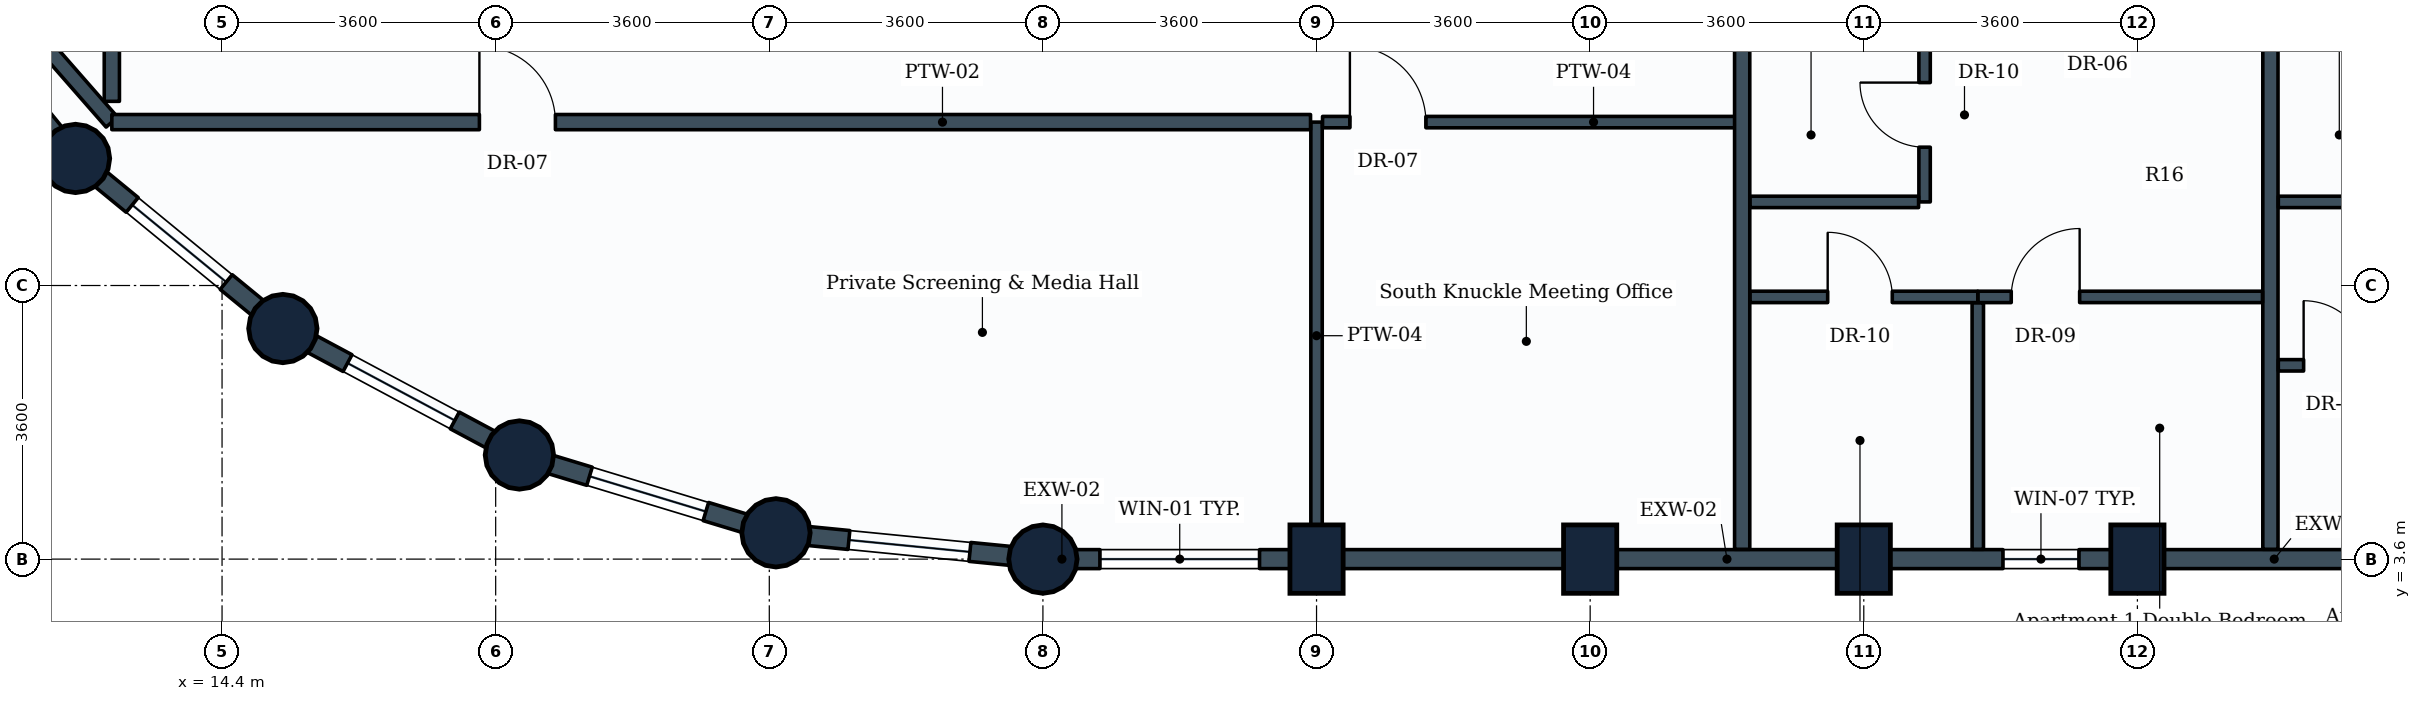
"""IFC4 building model, lengths in metres.
Left out: names, types, materials, properties, quantities, classifications, styles, units other than length and angle.
Written with IfcOpenShell. Run it as: python <this file> out.ifc"""

import sys

from ifc_helpers import new_model, si_unit, direction, frame, frame_2d, origin, origin_2d, place, context, subcontext, project, spatial, rectangle, circle, extrude, element, fill, save


model = new_model("IFC4")
c1 = context("Model", 3, precision=1e-05, world=origin(), true_north=direction((0.0, 1.0)))
c2 = subcontext(c1, "Body", "Model", "MODEL_VIEW")
j1 = project(units=[si_unit("LENGTHUNIT", "METRE"), si_unit("PLANEANGLEUNIT", "RADIAN")], contexts=[c1])
p1 = place(None, origin())
s1 = spatial("IfcSite", under=j1, at=p1, CompositionType="ELEMENT")
p2 = place(p1, origin())
s2 = spatial("IfcBuilding", under=s1, at=p2, CompositionType="ELEMENT")
p3 = place(p2, frame((0.0, 0.0, 186.2)))
s3 = spatial("IfcBuildingStorey", under=s2, at=p3, CompositionType="ELEMENT", Elevation=186.2)
for number, where, z_axis, x_axis in (
    (1, (12.472, 8.872, 0.0), (0.0, 0.0, 1.0), (1.0, 0.0, 0.0)),
    (2, (15.2, 6.634, 0.0), (0.0, 0.0, 1.0), (1.0, 0.0, 0.0)),
    (3, (18.312, 4.97, 0.0), (0.0, 0.0, 1.0), (1.0, 0.0, 0.0)),
    (4, (21.688, 3.946, 0.0), (0.0, 0.0, 1.0), (1.0, 0.0, 0.0)),
    (5, (25.2, 3.6, 0.0), (0.0, 0.0, 1.0), (1.0, 0.0, 0.0)),
):
    element("IfcColumn", number, at=place(p3, frame(where, z_axis=z_axis, x_axis=x_axis)), inside=s3, PredefinedType="COLUMN", context=c2, shape_type="SweptSolid", body=[
        extrude(circle(Radius=0.45, at=origin_2d()), origin(), (0.0, 0.0, 1.0), 3.8),
    ])
for number, where, z_axis, x_axis in (
    (6, (28.8, 3.6, 0.0), (0.0, 0.0, 1.0), (1.0, 0.0, 0.0)),
    (7, (32.4, 3.6, 0.0), (0.0, 0.0, 1.0), (1.0, 0.0, 0.0)),
    (8, (36.0, 3.6, 0.0), (0.0, 0.0, 1.0), (1.0, 0.0, 0.0)),
    (9, (39.6, 3.6, 0.0), (0.0, 0.0, 1.0), (1.0, 0.0, 0.0)),
):
    element("IfcColumn", number, at=place(p3, frame(where, z_axis=z_axis, x_axis=x_axis)), inside=s3, PredefinedType="COLUMN", context=c2, shape_type="SweptSolid", body=[
        extrude(rectangle(XDim=0.7, YDim=0.9, at=origin_2d()), origin(), (0.0, 0.0, 1.0), 3.8),
    ])
p4 = place(p3, frame((28.8, 3.6, 0.0), z_axis=(0.0, 0.0, 1.0), x_axis=(-1.0, 0.0, 0.0)))
e10 = element("IfcWall", 10, at=p4, inside=s3, PredefinedType="STANDARD", context=c2, shape_type="SweptSolid", body=[
    extrude(rectangle(XDim=3.6, YDim=0.25, at=frame_2d((1.8, 0.0))), origin(), (0.0, 0.0, 1.0), 2.93),
])
p5 = place(p4, frame((0.75, 0.0, 0.85)))
e11 = element("IfcOpeningElement", 11, at=p5, cuts=e10, PredefinedType="OPENING", context=c2, shape_type="SweptSolid", body=[
    extrude(rectangle(XDim=2.1, YDim=1.35, at=frame_2d((1.05, 0.675))), frame((0.0, 0.135, 0.0), z_axis=(0.0, -1.0, 0.0), x_axis=(1.0, 0.0, 0.0)), (0.0, 0.0, 1.0), 0.27),
])
p6 = place(p3, frame((32.4, 3.6, 0.0), z_axis=(0.0, 0.0, 1.0), x_axis=(-1.0, 0.0, 0.0)))
e12 = element("IfcWall", 12, at=p6, inside=s3, PredefinedType="STANDARD", context=c2, shape_type="SweptSolid", body=[
    extrude(rectangle(XDim=3.6, YDim=0.25, at=frame_2d((1.8, 0.0))), origin(), (0.0, 0.0, 1.0), 2.93),
])
p7 = place(p3, frame((36.0, 3.6, 0.0), z_axis=(0.0, 0.0, 1.0), x_axis=(-1.0, 0.0, 0.0)))
e13 = element("IfcWall", 13, at=p7, inside=s3, PredefinedType="STANDARD", context=c2, shape_type="SweptSolid", body=[
    extrude(rectangle(XDim=3.6, YDim=0.25, at=frame_2d((1.8, 0.0))), origin(), (0.0, 0.0, 1.0), 2.93),
])
p8 = place(p3, frame((39.6, 3.6, 0.0), z_axis=(0.0, 0.0, 1.0), x_axis=(-1.0, 0.0, 0.0)))
e14 = element("IfcWall", 14, at=p8, inside=s3, PredefinedType="STANDARD", context=c2, shape_type="SweptSolid", body=[
    extrude(rectangle(XDim=3.6, YDim=0.25, at=frame_2d((1.8, 0.0))), origin(), (0.0, 0.0, 1.0), 2.93),
])
p9 = place(p8, frame((0.769, 0.0, 0.85)))
e15 = element("IfcOpeningElement", 15, at=p9, cuts=e14, PredefinedType="OPENING", context=c2, shape_type="SweptSolid", body=[
    extrude(rectangle(XDim=1.0, YDim=1.35, at=frame_2d((0.5, 0.675))), frame((0.0, 0.135, 0.0), z_axis=(0.0, -1.0, 0.0), x_axis=(1.0, 0.0, 0.0)), (0.0, 0.0, 1.0), 0.27),
])
p10 = place(p3, frame((43.2, 3.6, 0.0), z_axis=(0.0, 0.0, 1.0), x_axis=(-1.0, 0.0, 0.0)))
e16 = element("IfcWall", 16, at=p10, inside=s3, PredefinedType="STANDARD", context=c2, shape_type="SweptSolid", body=[
    extrude(rectangle(XDim=3.6, YDim=0.25, at=frame_2d((1.8, 0.0))), origin(), (0.0, 0.0, 1.0), 2.93),
])
p11 = place(p3, frame((12.472, 8.872, 0.0), z_axis=(0.0, 0.0, 1.0), x_axis=(-0.634258295121, 0.773121216285, 0.0)))
e17 = element("IfcWall", 17, at=p11, inside=s3, PredefinedType="STANDARD", context=c2, shape_type="SweptSolid", body=[
    extrude(rectangle(XDim=3.529, YDim=0.25, at=frame_2d((1.764, 0.0))), origin(), (0.0, 0.0, 1.0), 2.93),
])
p12 = place(p11, frame((0.964, 0.0, 0.85)))
e18 = element("IfcOpeningElement", 18, at=p12, cuts=e17, PredefinedType="OPENING", context=c2, shape_type="SweptSolid", body=[
    extrude(rectangle(XDim=1.6, YDim=1.35, at=frame_2d((0.8, 0.675))), frame((0.0, 0.135, 0.0), z_axis=(0.0, -1.0, 0.0), x_axis=(1.0, 0.0, 0.0)), (0.0, 0.0, 1.0), 0.27),
])
p13 = place(p3, frame((15.2, 6.634, 0.0), z_axis=(0.0, 0.0, 1.0), x_axis=(-0.773121216285, 0.634258295121, 0.0)))
e19 = element("IfcWall", 19, at=p13, inside=s3, PredefinedType="STANDARD", context=c2, shape_type="SweptSolid", body=[
    extrude(rectangle(XDim=3.529, YDim=0.25, at=frame_2d((1.764, 0.0))), origin(), (0.0, 0.0, 1.0), 2.93),
])
p14 = place(p13, frame((0.964, 0.0, 0.85)))
e20 = element("IfcOpeningElement", 20, at=p14, cuts=e19, PredefinedType="OPENING", context=c2, shape_type="SweptSolid", body=[
    extrude(rectangle(XDim=1.6, YDim=1.35, at=frame_2d((0.8, 0.675))), frame((0.0, 0.135, 0.0), z_axis=(0.0, -1.0, 0.0), x_axis=(1.0, 0.0, 0.0)), (0.0, 0.0, 1.0), 0.27),
])
p15 = place(p3, frame((18.312, 4.97, 0.0), z_axis=(0.0, 0.0, 1.0), x_axis=(-0.881846862014, 0.471535907389, 0.0)))
e21 = element("IfcWall", 21, at=p15, inside=s3, PredefinedType="STANDARD", context=c2, shape_type="SweptSolid", body=[
    extrude(rectangle(XDim=3.529, YDim=0.25, at=frame_2d((1.765, 0.0))), origin(), (0.0, 0.0, 1.0), 2.93),
])
p16 = place(p15, frame((0.964, 0.0, 0.85)))
e22 = element("IfcOpeningElement", 22, at=p16, cuts=e21, PredefinedType="OPENING", context=c2, shape_type="SweptSolid", body=[
    extrude(rectangle(XDim=1.6, YDim=1.35, at=frame_2d((0.8, 0.675))), frame((0.0, 0.135, 0.0), z_axis=(0.0, -1.0, 0.0), x_axis=(1.0, 0.0, 0.0)), (0.0, 0.0, 1.0), 0.27),
])
p17 = place(p3, frame((21.688, 3.946, 0.0), z_axis=(0.0, 0.0, 1.0), x_axis=(-0.956953367403, 0.290241714123, 0.0)))
e23 = element("IfcWall", 23, at=p17, inside=s3, PredefinedType="STANDARD", context=c2, shape_type="SweptSolid", body=[
    extrude(rectangle(XDim=3.528, YDim=0.25, at=frame_2d((1.764, 0.0))), origin(), (0.0, 0.0, 1.0), 2.93),
])
p18 = place(p17, frame((0.964, 0.0, 0.85)))
e24 = element("IfcOpeningElement", 24, at=p18, cuts=e23, PredefinedType="OPENING", context=c2, shape_type="SweptSolid", body=[
    extrude(rectangle(XDim=1.6, YDim=1.35, at=frame_2d((0.8, 0.675))), frame((0.0, 0.135, 0.0), z_axis=(0.0, -1.0, 0.0), x_axis=(1.0, 0.0, 0.0)), (0.0, 0.0, 1.0), 0.27),
])
p19 = place(p3, frame((25.2, 3.6, 0.0), z_axis=(0.0, 0.0, 1.0), x_axis=(-0.995183369056, 0.098030923459, 0.0)))
e25 = element("IfcWall", 25, at=p19, inside=s3, PredefinedType="STANDARD", context=c2, shape_type="SweptSolid", body=[
    extrude(rectangle(XDim=3.529, YDim=0.25, at=frame_2d((1.765, 0.0))), origin(), (0.0, 0.0, 1.0), 2.93),
])
p20 = place(p19, frame((0.965, 0.0, 0.85)))
e26 = element("IfcOpeningElement", 26, at=p20, cuts=e25, PredefinedType="OPENING", context=c2, shape_type="SweptSolid", body=[
    extrude(rectangle(XDim=1.6, YDim=1.35, at=frame_2d((0.8, 0.675))), frame((0.0, 0.135, 0.0), z_axis=(0.0, -1.0, 0.0), x_axis=(1.0, 0.0, 0.0)), (0.0, 0.0, 1.0), 0.27),
])
p21 = place(p3, frame((28.8, 9.35, 0.0), z_axis=(0.0, 0.0, 1.0), x_axis=(0.0, -1.0, 0.0)))
e27 = element("IfcWall", 27, at=p21, inside=s3, PredefinedType="PARTITIONING", context=c2, shape_type="SweptSolid", body=[
    extrude(rectangle(XDim=5.621, YDim=0.15, at=frame_2d((2.811, 0.0))), origin(), (0.0, 0.0, 1.0), 3.535),
])
p22 = place(p3, frame((12.95, 9.35, 0.0), z_axis=(0.0, 0.0, 1.0), x_axis=(-0.658639514157, 0.752458630352, 0.0)))
e28 = element("IfcWall", 28, at=p22, inside=s3, PredefinedType="PARTITIONING", context=c2, shape_type="SweptSolid", body=[
    extrude(rectangle(XDim=4.996, YDim=0.2, at=frame_2d((2.498, 0.0))), origin(), (0.0, 0.0, 1.0), 2.93),
])
p23 = place(p3, frame((12.95, 9.623, 0.0), z_axis=(0.0, 0.0, 1.0), x_axis=(0.0, 1.0, 0.0)))
e29 = element("IfcWall", 29, at=p23, inside=s3, PredefinedType="PARTITIONING", context=c2, shape_type="SweptSolid", body=[
    extrude(rectangle(XDim=6.873, YDim=0.2, at=frame_2d((3.437, 0.0))), origin(), (0.0, 0.0, 1.0), 3.17),
])
p24 = place(p23, frame((3.958, 0.0, 0.0)))
e30 = element("IfcOpeningElement", 30, at=p24, cuts=e29, PredefinedType="OPENING", context=c2, shape_type="SweptSolid", body=[
    extrude(rectangle(XDim=1.0, YDim=2.1, at=frame_2d((0.5, 1.05))), frame((0.0, 0.11, 0.0), z_axis=(0.0, -1.0, 0.0), x_axis=(1.0, 0.0, 0.0)), (0.0, 0.0, 1.0), 0.22),
])
p25 = place(p3, frame((12.95, 9.35, 0.0), z_axis=(0.0, 0.0, 1.0), x_axis=(1.0, 0.0, 0.0)))
e31 = element("IfcWall", 31, at=p25, inside=s3, PredefinedType="PARTITIONING", context=c2, shape_type="SweptSolid", body=[
    extrude(rectangle(XDim=15.771, YDim=0.2, at=frame_2d((7.885, 0.0))), origin(), (0.0, 0.0, 1.0), 3.17),
])
p26 = place(p25, frame((4.836, 0.0, 0.0)))
e32 = element("IfcOpeningElement", 32, at=p26, cuts=e31, PredefinedType="OPENING", context=c2, shape_type="SweptSolid", body=[
    extrude(rectangle(XDim=1.0, YDim=2.1, at=frame_2d((0.5, 1.05))), frame((0.0, 0.11, 0.0), z_axis=(0.0, -1.0, 0.0), x_axis=(1.0, 0.0, 0.0)), (0.0, 0.0, 1.0), 0.22),
])
p27 = place(p3, frame((28.879, 9.35, 0.0), z_axis=(0.0, 0.0, 1.0), x_axis=(1.0, 0.0, 0.0)))
e33 = element("IfcWall", 33, at=p27, inside=s3, PredefinedType="PARTITIONING", context=c2, shape_type="SweptSolid", body=[
    extrude(rectangle(XDim=5.521, YDim=0.15, at=frame_2d((2.76, 0.0))), origin(), (0.0, 0.0, 1.0), 3.535),
])
p28 = place(p27, frame((0.36, 0.0, 0.0)))
e34 = element("IfcOpeningElement", 34, at=p28, cuts=e33, PredefinedType="OPENING", context=c2, shape_type="SweptSolid", body=[
    extrude(rectangle(XDim=1.0, YDim=2.1, at=frame_2d((0.5, 1.05))), frame((0.0, 0.085, 0.0), z_axis=(0.0, -1.0, 0.0), x_axis=(1.0, 0.0, 0.0)), (0.0, 0.0, 1.0), 0.17),
])
for number, where, z_axis, x_axis in (
    (35, (34.4, 3.729, 0.0), (0.0, 0.0, 1.0), (0.0, 1.0, 0.0)),
    (36, (41.35, 3.729, 0.0), (0.0, 0.0, 1.0), (0.0, 1.0, 0.0)),
):
    element("IfcWall", number, at=place(p3, frame(where, z_axis=z_axis, x_axis=x_axis)), inside=s3, PredefinedType="PARTITIONING", context=c2, shape_type="SweptSolid", body=[
        extrude(rectangle(XDim=6.921, YDim=0.2, at=frame_2d((3.46, 0.0))), origin(), (0.0, 0.0, 1.0), 2.93),
    ])
p29 = place(p3, frame((36.8, 8.3, 0.0), z_axis=(0.0, 0.0, 1.0), x_axis=(0.0, 1.0, 0.0)))
e37 = element("IfcWall", 37, at=p29, inside=s3, PredefinedType="PARTITIONING", context=c2, shape_type="SweptSolid", body=[
    extrude(rectangle(XDim=2.246, YDim=0.15, at=frame_2d((1.123, 0.0))), origin(), (0.0, 0.0, 1.0), 3.535),
])
p30 = place(p29, frame((0.72, 0.0, 0.0)))
e38 = element("IfcOpeningElement", 38, at=p30, cuts=e37, PredefinedType="OPENING", context=c2, shape_type="SweptSolid", body=[
    extrude(rectangle(XDim=0.85, YDim=2.1, at=frame_2d((0.425, 1.05))), frame((0.0, 0.085, 0.0), z_axis=(0.0, -1.0, 0.0), x_axis=(1.0, 0.0, 0.0)), (0.0, 0.0, 1.0), 0.17),
])
p31 = place(p3, frame((34.504, 8.3, 0.0), z_axis=(0.0, 0.0, 1.0), x_axis=(1.0, 0.0, 0.0)))
e39 = element("IfcWall", 39, at=p31, inside=s3, PredefinedType="PARTITIONING", context=c2, shape_type="SweptSolid", body=[
    extrude(rectangle(XDim=2.217, YDim=0.15, at=frame_2d((1.108, 0.0))), origin(), (0.0, 0.0, 1.0), 3.22),
])
p32 = place(p3, frame((37.5, 7.05, 0.0), z_axis=(0.0, 0.0, 1.0), x_axis=(1.0, 0.0, 0.0)))
e40 = element("IfcWall", 40, at=p32, inside=s3, PredefinedType="PARTITIONING", context=c2, shape_type="SweptSolid", body=[
    extrude(rectangle(XDim=3.746, YDim=0.15, at=frame_2d((1.873, 0.0))), origin(), (0.0, 0.0, 1.0), 3.17),
])
p33 = place(p32, frame((0.44, 0.0, 0.0)))
e41 = element("IfcOpeningElement", 41, at=p33, cuts=e40, PredefinedType="OPENING", context=c2, shape_type="SweptSolid", body=[
    extrude(rectangle(XDim=0.9, YDim=2.1, at=frame_2d((0.45, 1.05))), frame((0.0, 0.085, 0.0), z_axis=(0.0, -1.0, 0.0), x_axis=(1.0, 0.0, 0.0)), (0.0, 0.0, 1.0), 0.17),
])
p34 = place(p3, frame((34.504, 7.05, 0.0), z_axis=(0.0, 0.0, 1.0), x_axis=(1.0, 0.0, 0.0)))
e42 = element("IfcWall", 42, at=p34, inside=s3, PredefinedType="PARTITIONING", context=c2, shape_type="SweptSolid", body=[
    extrude(rectangle(XDim=2.996, YDim=0.15, at=frame_2d((1.498, 0.0))), origin(), (0.0, 0.0, 1.0), 3.17),
])
p35 = place(p34, frame((1.021, 0.0, 0.0)))
e43 = element("IfcOpeningElement", 43, at=p35, cuts=e42, PredefinedType="OPENING", context=c2, shape_type="SweptSolid", body=[
    extrude(rectangle(XDim=0.85, YDim=2.1, at=frame_2d((0.425, 1.05))), frame((0.0, 0.085, 0.0), z_axis=(0.0, -1.0, 0.0), x_axis=(1.0, 0.0, 0.0)), (0.0, 0.0, 1.0), 0.17),
])
p36 = place(p3, frame((37.5, 3.729, 0.0), z_axis=(0.0, 0.0, 1.0), x_axis=(0.0, 1.0, 0.0)))
e44 = element("IfcWall", 44, at=p36, inside=s3, PredefinedType="PARTITIONING", context=c2, shape_type="SweptSolid", body=[
    extrude(rectangle(XDim=3.242, YDim=0.15, at=frame_2d((1.621, 0.0))), origin(), (0.0, 0.0, 1.0), 2.93),
])
p37 = place(p3, frame((41.454, 8.3, 0.0), z_axis=(0.0, 0.0, 1.0), x_axis=(1.0, 0.0, 0.0)))
e45 = element("IfcWall", 45, at=p37, inside=s3, PredefinedType="PARTITIONING", context=c2, shape_type="SweptSolid", body=[
    extrude(rectangle(XDim=2.217, YDim=0.15, at=frame_2d((1.108, 0.0))), origin(), (0.0, 0.0, 1.0), 3.18),
])
p38 = place(p3, frame((41.454, 6.15, 0.0), z_axis=(0.0, 0.0, 1.0), x_axis=(1.0, 0.0, 0.0)))
e46 = element("IfcWall", 46, at=p38, inside=s3, PredefinedType="PARTITIONING", context=c2, shape_type="SweptSolid", body=[
    extrude(rectangle(XDim=2.996, YDim=0.15, at=frame_2d((1.498, 0.0))), origin(), (0.0, 0.0, 1.0), 3.18),
])
p39 = place(p38, frame((0.333, 0.0, 0.0)))
e47 = element("IfcOpeningElement", 47, at=p39, cuts=e46, PredefinedType="OPENING", context=c2, shape_type="SweptSolid", body=[
    extrude(rectangle(XDim=0.85, YDim=2.1, at=frame_2d((0.425, 1.05))), frame((0.0, 0.085, 0.0), z_axis=(0.0, -1.0, 0.0), x_axis=(1.0, 0.0, 0.0)), (0.0, 0.0, 1.0), 0.17),
])
p40 = place(p5, origin())
e48 = element("IfcWindow", 48, at=p40, inside=s3, PartitioningType="SINGLE_PANEL", PredefinedType="WINDOW", context=c2, shape_type="SweptSolid", body=[
    extrude(rectangle(XDim=2.1, YDim=1.35, at=frame_2d((1.05, 0.675))), frame((0.0, 0.03, 0.0), z_axis=(0.0, -1.0, 0.0), x_axis=(1.0, 0.0, 0.0)), (0.0, 0.0, 1.0), 0.06),
])
fill(e11, e48)
p41 = place(p14, origin())
e49 = element("IfcWindow", 49, at=p41, inside=s3, PartitioningType="SINGLE_PANEL", PredefinedType="WINDOW", context=c2, shape_type="SweptSolid", body=[
    extrude(rectangle(XDim=1.6, YDim=1.35, at=frame_2d((0.8, 0.675))), frame((0.0, 0.03, 0.0), z_axis=(0.0, -1.0, 0.0), x_axis=(1.0, 0.0, 0.0)), (0.0, 0.0, 1.0), 0.06),
])
fill(e20, e49)
p42 = place(p16, origin())
e50 = element("IfcWindow", 50, at=p42, inside=s3, PartitioningType="SINGLE_PANEL", PredefinedType="WINDOW", context=c2, shape_type="SweptSolid", body=[
    extrude(rectangle(XDim=1.6, YDim=1.35, at=frame_2d((0.8, 0.675))), frame((0.0, 0.03, 0.0), z_axis=(0.0, -1.0, 0.0), x_axis=(1.0, 0.0, 0.0)), (0.0, 0.0, 1.0), 0.06),
])
fill(e22, e50)
p43 = place(p18, origin())
e51 = element("IfcWindow", 51, at=p43, inside=s3, PartitioningType="SINGLE_PANEL", PredefinedType="WINDOW", context=c2, shape_type="SweptSolid", body=[
    extrude(rectangle(XDim=1.6, YDim=1.35, at=frame_2d((0.8, 0.675))), frame((0.0, 0.03, 0.0), z_axis=(0.0, -1.0, 0.0), x_axis=(1.0, 0.0, 0.0)), (0.0, 0.0, 1.0), 0.06),
])
fill(e24, e51)
p44 = place(p20, origin())
e52 = element("IfcWindow", 52, at=p44, inside=s3, PartitioningType="SINGLE_PANEL", PredefinedType="WINDOW", context=c2, shape_type="SweptSolid", body=[
    extrude(rectangle(XDim=1.6, YDim=1.35, at=frame_2d((0.8, 0.675))), frame((0.0, 0.03, 0.0), z_axis=(0.0, -1.0, 0.0), x_axis=(1.0, 0.0, 0.0)), (0.0, 0.0, 1.0), 0.06),
])
fill(e26, e52)
p45 = place(p26, origin())
e53 = element("IfcDoor", 53, at=p45, inside=s3, OperationType="SINGLE_SWING_LEFT", PredefinedType="DOOR", context=c2, shape_type="SweptSolid", body=[
    extrude(rectangle(XDim=1.0, YDim=2.1, at=frame_2d((0.5, 1.05))), frame((0.0, 0.025, 0.0), z_axis=(0.0, -1.0, 0.0), x_axis=(1.0, 0.0, 0.0)), (0.0, 0.0, 1.0), 0.05),
])
fill(e32, e53)
p46 = place(p28, origin())
e54 = element("IfcDoor", 54, at=p46, inside=s3, OperationType="SINGLE_SWING_LEFT", PredefinedType="DOOR", context=c2, shape_type="SweptSolid", body=[
    extrude(rectangle(XDim=1.0, YDim=2.1, at=frame_2d((0.5, 1.05))), frame((0.0, 0.025, 0.0), z_axis=(0.0, -1.0, 0.0), x_axis=(1.0, 0.0, 0.0)), (0.0, 0.0, 1.0), 0.05),
])
fill(e34, e54)
p47 = place(p30, origin())
e55 = element("IfcDoor", 55, at=p47, inside=s3, OperationType="SINGLE_SWING_RIGHT", PredefinedType="DOOR", context=c2, shape_type="SweptSolid", body=[
    extrude(rectangle(XDim=0.85, YDim=2.1, at=frame_2d((0.425, 1.05))), frame((0.0, 0.025, 0.0), z_axis=(0.0, -1.0, 0.0), x_axis=(1.0, 0.0, 0.0)), (0.0, 0.0, 1.0), 0.05),
])
fill(e38, e55)
p48 = place(p33, origin())
e56 = element("IfcDoor", 56, at=p48, inside=s3, OperationType="SINGLE_SWING_RIGHT", PredefinedType="DOOR", context=c2, shape_type="SweptSolid", body=[
    extrude(rectangle(XDim=0.9, YDim=2.1, at=frame_2d((0.45, 1.05))), frame((0.0, 0.025, 0.0), z_axis=(0.0, -1.0, 0.0), x_axis=(1.0, 0.0, 0.0)), (0.0, 0.0, 1.0), 0.05),
])
fill(e41, e56)
p49 = place(p35, origin())
e57 = element("IfcDoor", 57, at=p49, inside=s3, OperationType="SINGLE_SWING_LEFT", PredefinedType="DOOR", context=c2, shape_type="SweptSolid", body=[
    extrude(rectangle(XDim=0.85, YDim=2.1, at=frame_2d((0.425, 1.05))), frame((0.0, 0.025, 0.0), z_axis=(0.0, -1.0, 0.0), x_axis=(1.0, 0.0, 0.0)), (0.0, 0.0, 1.0), 0.05),
])
fill(e43, e57)
p50 = place(p39, origin())
e58 = element("IfcDoor", 58, at=p50, inside=s3, OperationType="SINGLE_SWING_LEFT", PredefinedType="DOOR", context=c2, shape_type="SweptSolid", body=[
    extrude(rectangle(XDim=0.85, YDim=2.1, at=frame_2d((0.425, 1.05))), frame((0.0, 0.025, 0.0), z_axis=(0.0, -1.0, 0.0), x_axis=(1.0, 0.0, 0.0)), (0.0, 0.0, 1.0), 0.05),
])
fill(e47, e58)
p51 = place(p9, origin())
e59 = element("IfcWindow", 59, at=p51, inside=s3, PartitioningType="SINGLE_PANEL", PredefinedType="WINDOW", context=c2, shape_type="SweptSolid", body=[
    extrude(rectangle(XDim=1.0, YDim=1.35, at=frame_2d((0.5, 0.675))), frame((0.0, 0.03, 0.0), z_axis=(0.0, -1.0, 0.0), x_axis=(1.0, 0.0, 0.0)), (0.0, 0.0, 1.0), 0.06),
])
fill(e15, e59)
save(model, sys.argv[1])
